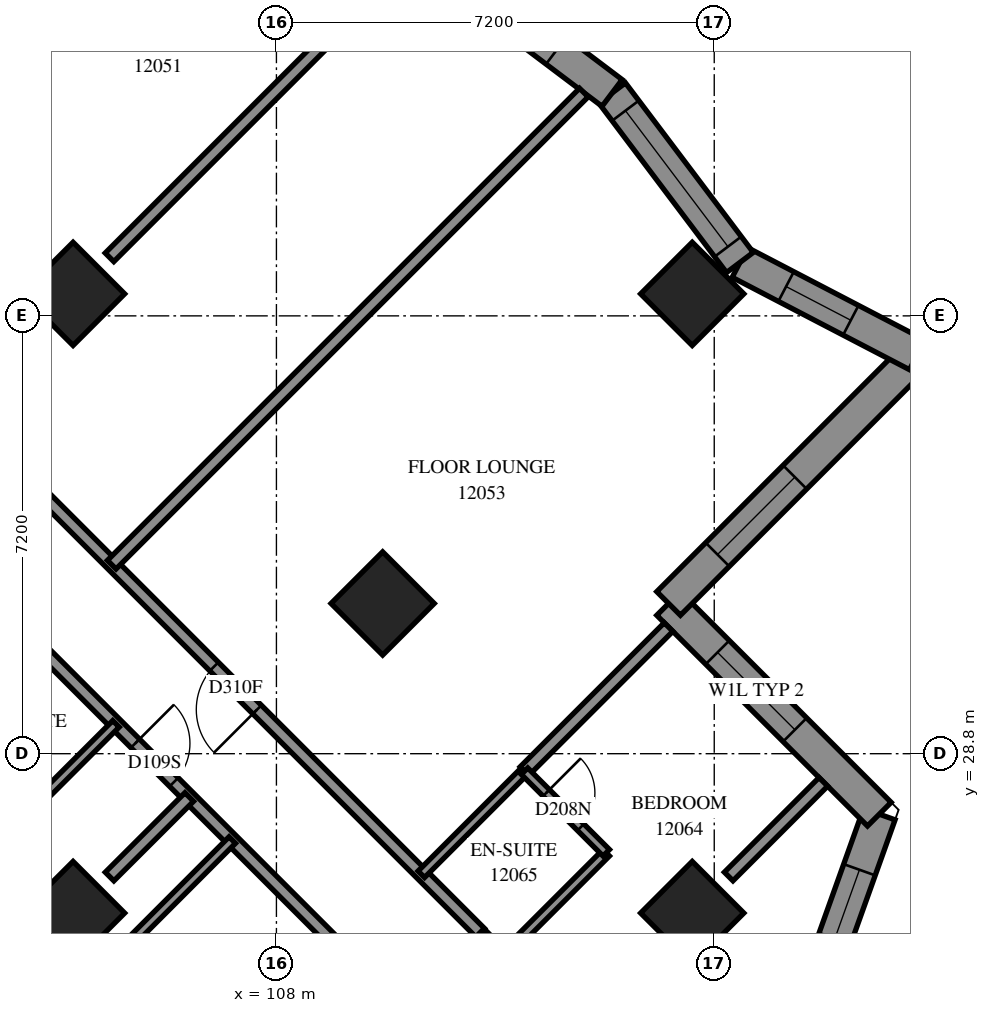
"""IFC4 building model, lengths in metres.
Left out: names, types, materials, properties, quantities, classifications, styles, units other than length and angle.
Written with IfcOpenShell. Run it as: python <this file> out.ifc"""

import sys

from ifc_helpers import new_model, si_unit, direction, frame, frame_2d, origin, origin_2d, place, context, subcontext, project, spatial, polyline, rectangle, outline, extrude, element, fill, save


model = new_model("IFC4")
c1 = context("Model", 3, precision=1e-05, world=origin(), true_north=direction((0.0, 1.0)))
c2 = subcontext(c1, "Body", "Model", "MODEL_VIEW")
j1 = project(units=[si_unit("LENGTHUNIT", "METRE"), si_unit("PLANEANGLEUNIT", "RADIAN")], contexts=[c1])
p1 = place(None, origin())
s1 = spatial("IfcSite", under=j1, at=p1, CompositionType="ELEMENT")
p2 = place(p1, origin())
s2 = spatial("IfcBuilding", under=s1, at=p2, CompositionType="ELEMENT")
p3 = place(p2, frame((0.0, 0.0, 47.4)))
s3 = spatial("IfcBuildingStorey", under=s2, at=p3, CompositionType="ELEMENT", Elevation=47.4)
for number, where, z_axis, x_axis in (
    (1, (104.656, 36.362, 0.0), (0.0, 0.0, 1.0), (0.707, -0.707, 0.0)),
    (2, (114.838, 36.362, 0.0), (0.0, 0.0, 1.0), (0.707, -0.707, 0.0)),
    (3, (109.747, 31.271, 0.0), (0.0, 0.0, 1.0), (0.707, -0.707, 0.0)),
    (4, (104.656, 26.18, 0.0), (0.0, 0.0, 1.0), (0.707, -0.707, 0.0)),
    (5, (114.838, 26.18, 0.0), (0.0, 0.0, 1.0), (0.707, -0.707, 0.0)),
):
    element("IfcColumn", number, at=place(p3, frame(where, z_axis=z_axis, x_axis=x_axis)), inside=s3, PredefinedType="COLUMN", context=c2, shape_type="SweptSolid", body=[
        extrude(rectangle(XDim=1.2, YDim=1.2, at=origin_2d()), origin(), (0.0, 0.0, 1.0), 3.1),
    ])
p4 = place(p3, frame((116.127, 22.804, 0.0), z_axis=(0.0, 0.0, 1.0), x_axis=(0.3366083403, 0.9416447447, 0.0)))
e6 = element("IfcWall", 6, at=p4, inside=s3, PredefinedType="SOLIDWALL", context=c2, shape_type="SweptSolid", body=[
    extrude(outline(polyline([(-0.125, -0.275), (5.485, -0.275), (5.137, 0.275), (0.125, 0.275), (-0.125, -0.275)])), origin(), (0.0, 0.0, 1.0), 3.1),
])
p5 = place(p4, frame((0.835, 0.0, 0.5)))
e7 = element("IfcOpeningElement", 7, at=p5, cuts=e6, PredefinedType="OPENING", context=c2, shape_type="SweptSolid", body=[
    extrude(rectangle(XDim=1.2, YDim=2.45, at=frame_2d((0.6, 1.225))), frame((0.0, 0.285, 0.0), z_axis=(0.0, -1.0, 0.0), x_axis=(1.0, 0.0, 0.0)), (0.0, 0.0, 1.0), 0.57),
])
p6 = place(p4, frame((3.141, 0.0, 0.5)))
e8 = element("IfcOpeningElement", 8, at=p6, cuts=e6, PredefinedType="OPENING", context=c2, shape_type="SweptSolid", body=[
    extrude(rectangle(XDim=1.2, YDim=2.45, at=frame_2d((0.6, 1.225))), frame((0.0, 0.285, 0.0), z_axis=(0.0, -1.0, 0.0), x_axis=(1.0, 0.0, 0.0)), (0.0, 0.0, 1.0), 0.57),
])
p7 = place(p3, frame((117.915, 27.805, 0.0), z_axis=(0.0, 0.0, 1.0), x_axis=(-0.7070965789, 0.7071169833, 0.0)))
e9 = element("IfcWall", 9, at=p7, inside=s3, PredefinedType="SOLIDWALL", context=c2, shape_type="SweptSolid", body=[
    extrude(outline(polyline([(-0.174, -0.275), (4.626, -0.275), (5.176, 0.275), (0.174, 0.275), (-0.174, -0.275)])), origin(), (0.0, 0.0, 1.0), 3.1),
])
p8 = place(p7, frame((1.963, 0.0, 0.6)))
e10 = element("IfcOpeningElement", 10, at=p8, cuts=e9, PredefinedType="OPENING", context=c2, shape_type="SweptSolid", body=[
    extrude(rectangle(XDim=1.8, YDim=1.9, at=frame_2d((0.9, 0.95))), frame((0.0, 0.285, 0.0), z_axis=(0.0, -1.0, 0.0), x_axis=(1.0, 0.0, 0.0)), (0.0, 0.0, 1.0), 0.57),
])
p9 = place(p3, frame((114.449, 31.271, 0.0), z_axis=(0.0, 0.0, 1.0), x_axis=(0.7070981337, 0.7071154285, 0.0)))
e11 = element("IfcWall", 11, at=p9, inside=s3, PredefinedType="SOLIDWALL", context=c2, shape_type="SweptSolid", body=[
    extrude(outline(polyline([(0.275, -0.275), (6.157, -0.275), (5.407, 0.275), (-0.275, 0.275), (0.275, -0.275)])), origin(), (0.0, 0.0, 1.0), 3.1),
])
p10 = place(p9, frame((1.137, 0.0, 0.6)))
e12 = element("IfcOpeningElement", 12, at=p10, cuts=e11, PredefinedType="OPENING", context=c2, shape_type="SweptSolid", body=[
    extrude(rectangle(XDim=1.8, YDim=1.9, at=frame_2d((0.9, 0.95))), frame((0.0, 0.285, 0.0), z_axis=(0.0, -1.0, 0.0), x_axis=(1.0, 0.0, 0.0)), (0.0, 0.0, 1.0), 0.57),
])
p11 = place(p3, frame((118.538, 35.359, 0.0), z_axis=(0.0, 0.0, 1.0), x_axis=(-0.8869138246, 0.4619349173, 0.0)))
e13 = element("IfcWall", 13, at=p11, inside=s3, PredefinedType="SOLIDWALL", context=c2, shape_type="SweptSolid", body=[
    extrude(outline(polyline([(-0.375, -0.275), (3.225, -0.275), (3.35, 0.275), (0.375, 0.275), (-0.375, -0.275)])), origin(), (0.0, 0.0, 1.0), 3.1),
])
p12 = place(p11, frame((1.231, 0.0, 0.5)))
e14 = element("IfcOpeningElement", 14, at=p12, cuts=e13, PredefinedType="OPENING", context=c2, shape_type="SweptSolid", body=[
    extrude(rectangle(XDim=1.2, YDim=2.45, at=frame_2d((0.6, 1.225))), frame((0.0, 0.285, 0.0), z_axis=(0.0, -1.0, 0.0), x_axis=(1.0, 0.0, 0.0)), (0.0, 0.0, 1.0), 0.57),
])
p13 = place(p3, frame((115.622, 36.878, 0.0), z_axis=(0.0, 0.0, 1.0), x_axis=(-0.6019733381, 0.7985161866, 0.0)))
e15 = element("IfcWall", 15, at=p13, inside=s3, PredefinedType="SOLIDWALL", context=c2, shape_type="SweptSolid", body=[
    extrude(outline(polyline([(0.062, -0.275), (3.53, -0.275), (3.453, 0.275), (-0.062, 0.275), (0.062, -0.275)])), origin(), (0.0, 0.0, 1.0), 3.1),
])
p14 = place(p13, frame((0.326, 0.0, 0.5)))
e16 = element("IfcOpeningElement", 16, at=p14, cuts=e15, PredefinedType="OPENING", context=c2, shape_type="SweptSolid", body=[
    extrude(rectangle(XDim=2.8, YDim=2.45, at=frame_2d((1.4, 1.225))), frame((0.0, 0.285, 0.0), z_axis=(0.0, -1.0, 0.0), x_axis=(1.0, 0.0, 0.0)), (0.0, 0.0, 1.0), 0.57),
])
p15 = place(p3, frame((113.52, 39.666, 0.0), z_axis=(0.0, 0.0, 1.0), x_axis=(-0.7985233882, 0.601963785, 0.0)))
e17 = element("IfcWall", 17, at=p15, inside=s3, PredefinedType="SOLIDWALL", context=c2, shape_type="SweptSolid", body=[
    extrude(outline(polyline([(-0.039, -0.275), (3.429, -0.275), (3.506, 0.275), (0.039, 0.275), (-0.039, -0.275)])), origin(), (0.0, 0.0, 1.0), 3.1),
])
p16 = place(p15, frame((1.153, 0.0, 0.5)))
e18 = element("IfcOpeningElement", 18, at=p16, cuts=e17, PredefinedType="OPENING", context=c2, shape_type="SweptSolid", body=[
    extrude(rectangle(XDim=1.2, YDim=2.45, at=frame_2d((0.6, 1.225))), frame((0.0, 0.285, 0.0), z_axis=(0.0, -1.0, 0.0), x_axis=(1.0, 0.0, 0.0)), (0.0, 0.0, 1.0), 0.57),
])
p17 = place(p3, frame((93.481, 41.167, 0.0), z_axis=(0.0, 0.0, 1.0), x_axis=(0.7071067812, -0.7071067812, 0.0)))
e19 = element("IfcWall", 19, at=p17, inside=s3, PredefinedType="PARTITIONING", context=c2, shape_type="SweptSolid", body=[
    extrude(rectangle(XDim=25.699, YDim=0.2, at=frame_2d((12.85, 0.0))), origin(), (0.0, 0.0, 1.0), 3.1),
])
p18 = place(p17, frame((2.8, 0.0, 0.0)))
e20 = element("IfcOpeningElement", 20, at=p18, cuts=e19, PredefinedType="OPENING", context=c2, shape_type="SweptSolid", body=[
    extrude(rectangle(XDim=0.9, YDim=2.1, at=frame_2d((0.45, 1.05))), frame((0.0, 0.11, 0.0), z_axis=(0.0, -1.0, 0.0), x_axis=(1.0, 0.0, 0.0)), (0.0, 0.0, 1.0), 0.22),
])
p19 = place(p17, frame((9.948, 0.0, 0.0)))
e21 = element("IfcOpeningElement", 21, at=p19, cuts=e19, PredefinedType="OPENING", context=c2, shape_type="SweptSolid", body=[
    extrude(rectangle(XDim=0.9, YDim=2.1, at=frame_2d((0.45, 1.05))), frame((0.0, 0.11, 0.0), z_axis=(0.0, -1.0, 0.0), x_axis=(1.0, 0.0, 0.0)), (0.0, 0.0, 1.0), 0.22),
])
p20 = place(p17, frame((11.7, 0.0, 0.0)))
e22 = element("IfcOpeningElement", 22, at=p20, cuts=e19, PredefinedType="OPENING", context=c2, shape_type="SweptSolid", body=[
    extrude(rectangle(XDim=0.9, YDim=2.1, at=frame_2d((0.45, 1.05))), frame((0.0, 0.11, 0.0), z_axis=(0.0, -1.0, 0.0), x_axis=(1.0, 0.0, 0.0)), (0.0, 0.0, 1.0), 0.22),
])
p21 = place(p17, frame((17.25, 0.0, 0.0)))
e23 = element("IfcOpeningElement", 23, at=p21, cuts=e19, PredefinedType="OPENING", context=c2, shape_type="SweptSolid", body=[
    extrude(rectangle(XDim=0.9, YDim=2.1, at=frame_2d((0.45, 1.05))), frame((0.0, 0.11, 0.0), z_axis=(0.0, -1.0, 0.0), x_axis=(1.0, 0.0, 0.0)), (0.0, 0.0, 1.0), 0.22),
])
p22 = place(p17, frame((22.82, 0.0, 0.0)))
e24 = element("IfcOpeningElement", 24, at=p22, cuts=e19, PredefinedType="OPENING", context=c2, shape_type="SweptSolid", body=[
    extrude(rectangle(XDim=0.9, YDim=2.1, at=frame_2d((0.45, 1.05))), frame((0.0, 0.11, 0.0), z_axis=(0.0, -1.0, 0.0), x_axis=(1.0, 0.0, 0.0)), (0.0, 0.0, 1.0), 0.22),
])
p23 = place(p3, frame((111.352, 25.855, 0.0), z_axis=(0.0, 0.0, 1.0), x_axis=(-0.7070418597, 0.7071716967, 0.0)))
e25 = element("IfcWall", 25, at=p23, inside=s3, PredefinedType="PARTITIONING", context=c2, shape_type="SweptSolid", body=[
    extrude(rectangle(XDim=13.864, YDim=0.2, at=frame_2d((6.932, 0.0))), origin(), (0.0, 0.0, 1.0), 3.1),
])
p24 = place(p23, frame((12.564, 0.0, 0.0)))
e26 = element("IfcOpeningElement", 26, at=p24, cuts=e25, PredefinedType="OPENING", context=c2, shape_type="SweptSolid", body=[
    extrude(rectangle(XDim=0.9, YDim=2.1, at=frame_2d((0.45, 1.05))), frame((0.0, 0.11, 0.0), z_axis=(0.0, -1.0, 0.0), x_axis=(1.0, 0.0, 0.0)), (0.0, 0.0, 1.0), 0.22),
])
p25 = place(p23, frame((5.19, 0.0, 0.0)))
e27 = element("IfcOpeningElement", 27, at=p25, cuts=e25, PredefinedType="OPENING", context=c2, shape_type="SweptSolid", body=[
    extrude(rectangle(XDim=1.0, YDim=2.1, at=frame_2d((0.5, 1.05))), frame((0.0, 0.11, 0.0), z_axis=(0.0, -1.0, 0.0), x_axis=(1.0, 0.0, 0.0)), (0.0, 0.0, 1.0), 0.22),
])
p26 = place(p3, frame((105.292, 31.908, 0.0), z_axis=(0.0, 0.0, 1.0), x_axis=(0.7071067812, 0.7071067812, 0.0)))
e28 = element("IfcWall", 28, at=p26, inside=s3, PredefinedType="PARTITIONING", context=c2, shape_type="SweptSolid", body=[
    extrude(rectangle(XDim=10.979, YDim=0.2, at=frame_2d((5.49, 0.0))), origin(), (0.0, 0.0, 1.0), 3.1),
])
p27 = place(p3, frame((101.896, 38.698, 0.0), z_axis=(0.0, 0.0, 1.0), x_axis=(0.7072298261, 0.7069837149, 0.0)))
e29 = element("IfcWall", 29, at=p27, inside=s3, PredefinedType="PARTITIONING", context=c2, shape_type="SweptSolid", body=[
    extrude(rectangle(XDim=8.533, YDim=0.2, at=frame_2d((4.266, 0.0))), origin(), (0.0, 0.0, 1.0), 3.1),
])
p28 = place(p3, frame((105.255, 36.963, 0.0), z_axis=(0.0, 0.0, 1.0), x_axis=(0.7071067812, 0.7071067812, 0.0)))
e30 = element("IfcWall", 30, at=p28, inside=s3, PredefinedType="PARTITIONING", context=c2, shape_type="SweptSolid", body=[
    extrude(rectangle(XDim=5.504, YDim=0.2, at=frame_2d((2.752, 0.0))), origin(), (0.0, 0.0, 1.0), 3.1),
])
p29 = place(p3, frame((112.079, 28.513, 0.0), z_axis=(0.0, 0.0, 1.0), x_axis=(0.7071067812, 0.7071067812, 0.0)))
e31 = element("IfcWall", 31, at=p29, inside=s3, PredefinedType="PARTITIONING", context=c2, shape_type="SweptSolid", body=[
    extrude(rectangle(XDim=3.351, YDim=0.2, at=frame_2d((1.675, 0.0))), origin(), (0.0, 0.0, 1.0), 3.1),
])
p30 = place(p3, frame((111.725, 25.473, 0.0), z_axis=(0.0, 0.0, 1.0), x_axis=(0.7071067812, 0.7071067812, 0.0)))
e32 = element("IfcWall", 32, at=p30, inside=s3, PredefinedType="PARTITIONING", context=c2, shape_type="SweptSolid", body=[
    extrude(rectangle(XDim=2.401, YDim=0.15, at=frame_2d((1.201, 0.0))), origin(), (0.0, 0.0, 1.0), 3.1),
])
p31 = place(p3, frame((105.578, 25.682, 0.0), z_axis=(0.0, 0.0, 1.0), x_axis=(0.706689978, 0.7075233388, 0.0)))
e33 = element("IfcWall", 33, at=p31, inside=s3, PredefinedType="PARTITIONING", context=c2, shape_type="SweptSolid", body=[
    extrude(rectangle(XDim=2.4, YDim=0.15, at=frame_2d((1.2, 0.0))), origin(), (0.0, 0.0, 1.0), 3.1),
])
for number, where, z_axis, x_axis in (
    (34, (110.383, 26.817, 0.0), (0.0, 0.0, 1.0), (0.707, 0.707, 0.0)),
    (35, (103.665, 27.595, 0.0), (0.0, 0.0, 1.0), (0.707, 0.707, 0.0)),
):
    element("IfcWall", number, at=place(p3, frame(where, z_axis=z_axis, x_axis=x_axis)), inside=s3, PredefinedType="PARTITIONING", context=c2, shape_type="SweptSolid", body=[
        extrude(rectangle(XDim=2.398, YDim=0.15, at=frame_2d((1.199, 0.0))), origin(), (0.0, 0.0, 1.0), 3.1),
    ])
p32 = place(p3, frame((112.925, 24.267, 0.0), z_axis=(0.0, 0.0, 1.0), x_axis=(-0.7068383786, 0.707375082, 0.0)))
e36 = element("IfcWall", 36, at=p32, inside=s3, PredefinedType="PARTITIONING", context=c2, shape_type="SweptSolid", body=[
    extrude(rectangle(XDim=2.236, YDim=0.2, at=frame_2d((1.118, 0.0))), origin(), (0.0, 0.0, 1.0), 3.1),
])
p33 = place(p32, frame((0.4, 0.0, 0.0)))
e37 = element("IfcOpeningElement", 37, at=p33, cuts=e36, PredefinedType="OPENING", context=c2, shape_type="SweptSolid", body=[
    extrude(rectangle(XDim=0.9, YDim=2.1, at=frame_2d((0.45, 1.05))), frame((0.0, 0.11, 0.0), z_axis=(0.0, -1.0, 0.0), x_axis=(1.0, 0.0, 0.0)), (0.0, 0.0, 1.0), 0.22),
])
p34 = place(p3, frame((115.438, 26.78, 0.0), z_axis=(0.0, 0.0, 1.0), x_axis=(0.7071067812, 0.7071067812, 0.0)))
e38 = element("IfcWall", 38, at=p34, inside=s3, PredefinedType="PARTITIONING", context=c2, shape_type="SweptSolid", body=[
    extrude(rectangle(XDim=2.201, YDim=0.2, at=frame_2d((1.101, 0.0))), origin(), (0.0, 0.0, 1.0), 3.1),
])
p35 = place(p3, frame((112.08, 28.512, 0.0), z_axis=(0.0, 0.0, 1.0), x_axis=(0.7076330979, -0.7065800724, 0.0)))
e39 = element("IfcWall", 39, at=p35, inside=s3, PredefinedType="PARTITIONING", context=c2, shape_type="SweptSolid", body=[
    extrude(rectangle(XDim=1.899, YDim=0.15, at=frame_2d((0.95, 0.0))), origin(), (0.0, 0.0, 1.0), 3.1),
])
p36 = place(p35, frame((0.505, 0.0, 0.0)))
e40 = element("IfcOpeningElement", 40, at=p36, cuts=e39, PredefinedType="OPENING", context=c2, shape_type="SweptSolid", body=[
    extrude(rectangle(XDim=0.8, YDim=2.1, at=frame_2d((0.4, 1.05))), frame((0.0, 0.085, 0.0), z_axis=(0.0, -1.0, 0.0), x_axis=(1.0, 0.0, 0.0)), (0.0, 0.0, 1.0), 0.17),
])
p37 = place(p3, frame((105.256, 26.78, 0.0), z_axis=(0.0, 0.0, 1.0), x_axis=(0.7076467632, 0.7065663865, 0.0)))
e41 = element("IfcWall", 41, at=p37, inside=s3, PredefinedType="PARTITIONING", context=c2, shape_type="SweptSolid", body=[
    extrude(rectangle(XDim=1.851, YDim=0.2, at=frame_2d((0.926, 0.0))), origin(), (0.0, 0.0, 1.0), 3.1),
])
p38 = place(p6, origin())
e42 = element("IfcWindow", 42, at=p38, inside=s3, PartitioningType="SINGLE_PANEL", PredefinedType="WINDOW", context=c2, shape_type="SweptSolid", body=[
    extrude(rectangle(XDim=1.2, YDim=2.45, at=frame_2d((0.6, 1.225))), frame((0.0, 0.155, 0.0), z_axis=(0.0, -1.0, 0.0), x_axis=(1.0, 0.0, 0.0)), (0.0, 0.0, 1.0), 0.06),
])
fill(e8, e42)
p39 = place(p8, origin())
e43 = element("IfcWindow", 43, at=p39, inside=s3, PartitioningType="SINGLE_PANEL", PredefinedType="WINDOW", context=c2, shape_type="SweptSolid", body=[
    extrude(rectangle(XDim=1.8, YDim=1.9, at=frame_2d((0.9, 0.95))), frame((0.0, 0.155, 0.0), z_axis=(0.0, -1.0, 0.0), x_axis=(1.0, 0.0, 0.0)), (0.0, 0.0, 1.0), 0.06),
])
fill(e10, e43)
p40 = place(p10, origin())
e44 = element("IfcWindow", 44, at=p40, inside=s3, PartitioningType="SINGLE_PANEL", PredefinedType="WINDOW", context=c2, shape_type="SweptSolid", body=[
    extrude(rectangle(XDim=1.8, YDim=1.9, at=frame_2d((0.9, 0.95))), frame((0.0, 0.155, 0.0), z_axis=(0.0, -1.0, 0.0), x_axis=(1.0, 0.0, 0.0)), (0.0, 0.0, 1.0), 0.06),
])
fill(e12, e44)
p41 = place(p12, origin())
e45 = element("IfcWindow", 45, at=p41, inside=s3, PartitioningType="SINGLE_PANEL", PredefinedType="WINDOW", context=c2, shape_type="SweptSolid", body=[
    extrude(rectangle(XDim=1.2, YDim=2.45, at=frame_2d((0.6, 1.225))), frame((0.0, 0.155, 0.0), z_axis=(0.0, -1.0, 0.0), x_axis=(1.0, 0.0, 0.0)), (0.0, 0.0, 1.0), 0.06),
])
fill(e14, e45)
p42 = place(p14, origin())
e46 = element("IfcWindow", 46, at=p42, inside=s3, PartitioningType="SINGLE_PANEL", PredefinedType="WINDOW", context=c2, shape_type="SweptSolid", body=[
    extrude(rectangle(XDim=2.8, YDim=2.45, at=frame_2d((1.4, 1.225))), frame((0.0, 0.155, 0.0), z_axis=(0.0, -1.0, 0.0), x_axis=(1.0, 0.0, 0.0)), (0.0, 0.0, 1.0), 0.06),
])
fill(e16, e46)
p43 = place(p16, origin())
e47 = element("IfcWindow", 47, at=p43, inside=s3, PartitioningType="SINGLE_PANEL", PredefinedType="WINDOW", context=c2, shape_type="SweptSolid", body=[
    extrude(rectangle(XDim=1.2, YDim=2.45, at=frame_2d((0.6, 1.225))), frame((0.0, 0.155, 0.0), z_axis=(0.0, -1.0, 0.0), x_axis=(1.0, 0.0, 0.0)), (0.0, 0.0, 1.0), 0.06),
])
fill(e18, e47)
p44 = place(p25, origin())
e48 = element("IfcDoor", 48, at=p44, inside=s3, OperationType="SINGLE_SWING_RIGHT", PredefinedType="DOOR", context=c2, shape_type="SweptSolid", body=[
    extrude(rectangle(XDim=1.0, YDim=2.1, at=frame_2d((0.5, 1.05))), frame((0.0, 0.025, 0.0), z_axis=(0.0, -1.0, 0.0), x_axis=(1.0, 0.0, 0.0)), (0.0, 0.0, 1.0), 0.05),
])
fill(e27, e48)
p45 = place(p21, origin())
e49 = element("IfcDoor", 49, at=p45, inside=s3, OperationType="SINGLE_SWING_LEFT", PredefinedType="DOOR", context=c2, shape_type="SweptSolid", body=[
    extrude(rectangle(XDim=0.9, YDim=2.1, at=frame_2d((0.45, 1.05))), frame((0.0, 0.025, 0.0), z_axis=(0.0, -1.0, 0.0), x_axis=(1.0, 0.0, 0.0)), (0.0, 0.0, 1.0), 0.05),
])
fill(e23, e49)
p46 = place(p36, origin())
e50 = element("IfcDoor", 50, at=p46, inside=s3, OperationType="SINGLE_SWING_RIGHT", PredefinedType="DOOR", context=c2, shape_type="SweptSolid", body=[
    extrude(rectangle(XDim=0.8, YDim=2.1, at=frame_2d((0.4, 1.05))), frame((0.0, 0.025, 0.0), z_axis=(0.0, -1.0, 0.0), x_axis=(1.0, 0.0, 0.0)), (0.0, 0.0, 1.0), 0.05),
])
fill(e40, e50)
save(model, sys.argv[1])
